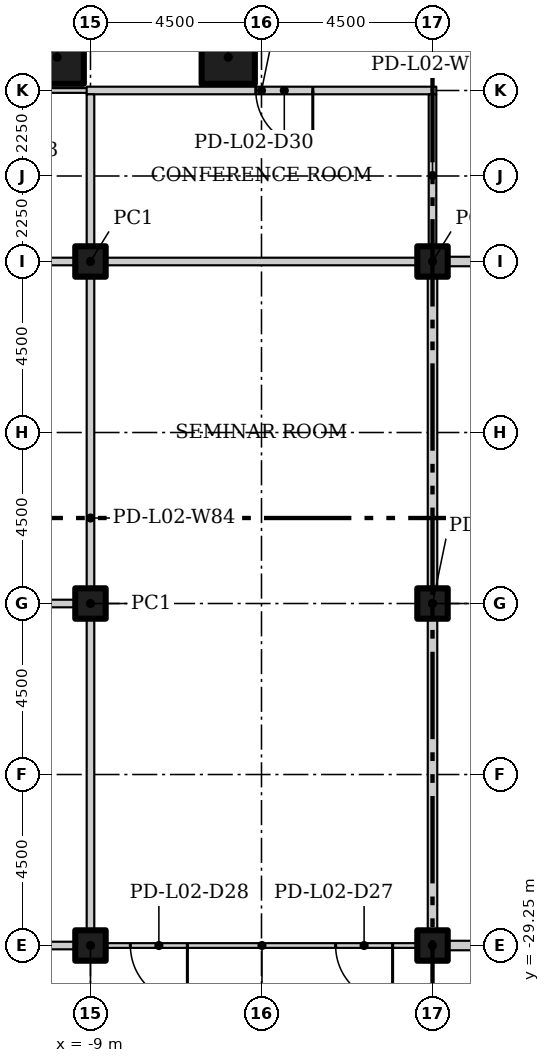
"""IFC4 building model, lengths in metres.
Left out: names, types, materials, properties, quantities, classifications, styles, units other than length and angle.
Written with IfcOpenShell. Run it as: python <this file> out.ifc"""

import sys

from ifc_helpers import new_model, si_unit, direction, frame, frame_2d, origin, origin_2d, place, context, subcontext, project, spatial, rectangle, hollow_rectangle, extrude, element, fill, save


model = new_model("IFC4")
c1 = context("Model", 3, precision=1e-05, world=origin(), true_north=direction((0.0, 1.0)))
c2 = subcontext(c1, "Body", "Model", "MODEL_VIEW")
j1 = project(units=[si_unit("LENGTHUNIT", "METRE"), si_unit("PLANEANGLEUNIT", "RADIAN")], contexts=[c1])
p1 = place(None, origin())
s1 = spatial("IfcSite", under=j1, at=p1, CompositionType="ELEMENT")
p2 = place(p1, origin())
s2 = spatial("IfcBuilding", under=s1, at=p2, CompositionType="ELEMENT")
p3 = place(p2, frame((0.0, 0.0, 12.5)))
s3 = spatial("IfcBuildingStorey", under=s2, at=p3, CompositionType="ELEMENT", Elevation=12.5)
for number, where in (
    (1, (-9.875, -5.875, 0.0)),
    (2, (-5.375, -5.875, 0.0)),
):
    element("IfcColumn", number, at=place(p3, frame(where)), inside=s3, PredefinedType="COLUMN", context=c2, shape_type="SweptSolid", body=[
        extrude(hollow_rectangle(XDim=1.4, YDim=1.4, WallThickness=0.06, at=origin_2d()), origin(), (0.0, 0.0, 1.0), 5.6),
    ])
for number, where in (
    (3, (-9.0, -29.25, 0.0)),
    (4, (-9.0, -20.25, 0.0)),
    (5, (-9.0, -11.25, 0.0)),
    (6, (0.0, -29.25, 0.0)),
    (7, (0.0, -20.25, 0.0)),
    (8, (0.0, -11.25, 0.0)),
):
    element("IfcColumn", number, at=place(p3, frame(where)), inside=s3, PredefinedType="COLUMN", context=c2, shape_type="SweptSolid", body=[
        extrude(hollow_rectangle(XDim=0.8, YDim=0.8, WallThickness=0.03, at=origin_2d()), origin(), (0.0, 0.0, 1.0), 5.6),
    ])
p4 = place(p3, frame((-13.5, -6.75, 0.0)))
e9 = element("IfcWall", 9, at=p4, inside=s3, PredefinedType="PARTITIONING", context=c2, shape_type="SweptSolid", body=[
    extrude(rectangle(XDim=4.6, YDim=0.125, at=frame_2d((2.3, 0.0))), origin(), (0.0, 0.0, 1.0), 5.6),
])
p5 = place(p4, frame((1.35, 0.0, 0.0)))
e10 = element("IfcOpeningElement", 10, at=p5, cuts=e9, PredefinedType="OPENING", context=c2, shape_type="SweptSolid", body=[
    extrude(rectangle(XDim=1.5, YDim=2.1, at=frame_2d((0.75, 1.05))), frame((0.0, 0.073, 0.0), z_axis=(0.0, -1.0, 0.0), x_axis=(1.0, 0.0, 0.0)), (0.0, 0.0, 1.0), 0.145),
])
p6 = place(p3, frame((0.1, -6.75, 0.0), z_axis=(0.0, 0.0, 1.0), x_axis=(-1.0, 0.0, 0.0)))
e11 = element("IfcWall", 11, at=p6, inside=s3, PredefinedType="PARTITIONING", context=c2, shape_type="SweptSolid", body=[
    extrude(rectangle(XDim=9.2, YDim=0.2, at=frame_2d((4.6, 0.0))), origin(), (0.0, 0.0, 1.0), 5.6),
])
p7 = place(p6, frame((3.25, 0.0, 0.0)))
e12 = element("IfcOpeningElement", 12, at=p7, cuts=e11, PredefinedType="OPENING", context=c2, shape_type="SweptSolid", body=[
    extrude(rectangle(XDim=1.5, YDim=2.1, at=frame_2d((0.75, 1.05))), frame((0.0, 0.11, 0.0), z_axis=(0.0, -1.0, 0.0), x_axis=(1.0, 0.0, 0.0)), (0.0, 0.0, 1.0), 0.22),
])
p8 = place(p3, frame((27.125, -29.25, 0.0), z_axis=(0.0, 0.0, 1.0), x_axis=(-1.0, 0.0, 0.0)))
e13 = element("IfcWall", 13, at=p8, inside=s3, PredefinedType="PARTITIONING", context=c2, shape_type="SweptSolid", body=[
    extrude(rectangle(XDim=27.25, YDim=0.25, at=frame_2d((13.625, 0.0))), origin(), (0.0, 0.0, 1.0), 5.6),
])
p9 = place(p8, frame((12.725, 0.0, 0.0)))
e14 = element("IfcOpeningElement", 14, at=p9, cuts=e13, PredefinedType="OPENING", context=c2, shape_type="SweptSolid", body=[
    extrude(rectangle(XDim=1.8, YDim=2.4, at=frame_2d((0.9, 1.2))), frame((0.0, 0.135, 0.0), z_axis=(0.0, -1.0, 0.0), x_axis=(1.0, 0.0, 0.0)), (0.0, 0.0, 1.0), 0.27),
])
p10 = place(p3, frame((-8.9, -29.25, 0.0), z_axis=(0.0, 0.0, 1.0), x_axis=(-1.0, 0.0, 0.0)))
e15 = element("IfcWall", 15, at=p10, inside=s3, PredefinedType="PARTITIONING", context=c2, shape_type="SweptSolid", body=[
    extrude(rectangle(XDim=18.2, YDim=0.2, at=frame_2d((9.1, 0.0))), origin(), (0.0, 0.0, 1.0), 5.6),
])
p11 = place(p10, frame((3.85, 0.0, 0.0)))
e16 = element("IfcOpeningElement", 16, at=p11, cuts=e15, PredefinedType="OPENING", context=c2, shape_type="SweptSolid", body=[
    extrude(rectangle(XDim=1.5, YDim=2.1, at=frame_2d((0.75, 1.05))), frame((0.0, 0.11, 0.0), z_axis=(0.0, -1.0, 0.0), x_axis=(1.0, 0.0, 0.0)), (0.0, 0.0, 1.0), 0.22),
])
p12 = place(p3, frame((0.125, -29.25, 0.0), z_axis=(0.0, 0.0, 1.0), x_axis=(-1.0, 0.0, 0.0)))
e17 = element("IfcWall", 17, at=p12, inside=s3, PredefinedType="PARTITIONING", context=c2, shape_type="SweptSolid", body=[
    extrude(rectangle(XDim=9.225, YDim=0.125, at=frame_2d((4.613, 0.0))), origin(), (0.0, 0.0, 1.0), 5.6),
])
p13 = place(p12, frame((1.175, 0.0, 0.0)))
e18 = element("IfcOpeningElement", 18, at=p13, cuts=e17, PredefinedType="OPENING", context=c2, shape_type="SweptSolid", body=[
    extrude(rectangle(XDim=1.5, YDim=2.1, at=frame_2d((0.75, 1.05))), frame((0.0, 0.073, 0.0), z_axis=(0.0, -1.0, 0.0), x_axis=(1.0, 0.0, 0.0)), (0.0, 0.0, 1.0), 0.145),
])
p14 = place(p12, frame((6.575, 0.0, 0.0)))
e19 = element("IfcOpeningElement", 19, at=p14, cuts=e17, PredefinedType="OPENING", context=c2, shape_type="SweptSolid", body=[
    extrude(rectangle(XDim=1.5, YDim=2.1, at=frame_2d((0.75, 1.05))), frame((0.0, 0.073, 0.0), z_axis=(0.0, -1.0, 0.0), x_axis=(1.0, 0.0, 0.0)), (0.0, 0.0, 1.0), 0.145),
])
p15 = place(p3, frame((0.0, -11.375, 0.0), z_axis=(0.0, 0.0, 1.0), x_axis=(0.0, -1.0, 0.0)))
e20 = element("IfcWall", 20, at=p15, inside=s3, PredefinedType="PARTITIONING", context=c2, shape_type="SweptSolid", body=[
    extrude(rectangle(XDim=17.75, YDim=0.25, at=frame_2d((8.875, 0.0))), origin(), (0.0, 0.0, 1.0), 5.6),
])
p16 = place(p3, frame((-0.125, -11.25, 0.0)))
e21 = element("IfcWall", 21, at=p16, inside=s3, PredefinedType="PARTITIONING", context=c2, shape_type="SweptSolid", body=[
    extrude(rectangle(XDim=18.25, YDim=0.25, at=frame_2d((9.125, 0.0))), origin(), (0.0, 0.0, 1.0), 5.6),
])
p17 = place(p16, frame((3.725, 0.0, 0.0)))
e22 = element("IfcOpeningElement", 22, at=p17, cuts=e21, PredefinedType="OPENING", context=c2, shape_type="SweptSolid", body=[
    extrude(rectangle(XDim=1.8, YDim=2.4, at=frame_2d((0.9, 1.2))), frame((0.0, 0.135, 0.0), z_axis=(0.0, -1.0, 0.0), x_axis=(1.0, 0.0, 0.0)), (0.0, 0.0, 1.0), 0.27),
])
p18 = place(p3, frame((0.125, -11.25, 0.0), z_axis=(0.0, 0.0, 1.0), x_axis=(-1.0, 0.0, 0.0)))
e23 = element("IfcWall", 23, at=p18, inside=s3, PredefinedType="PARTITIONING", context=c2, shape_type="SweptSolid", body=[
    extrude(rectangle(XDim=27.225, YDim=0.2, at=frame_2d((13.613, 0.0))), origin(), (0.0, 0.0, 1.0), 5.6),
])
p19 = place(p3, frame((-9.1, -20.25, 0.0), z_axis=(0.0, 0.0, 1.0), x_axis=(-1.0, 0.0, 0.0)))
e24 = element("IfcWall", 24, at=p19, inside=s3, PredefinedType="PARTITIONING", context=c2, shape_type="SweptSolid", body=[
    extrude(rectangle(XDim=17.8, YDim=0.2, at=frame_2d((8.9, 0.0))), origin(), (0.0, 0.0, 1.0), 5.6),
])
p20 = place(p3, frame((-9.0, -29.15, 0.0), z_axis=(0.0, 0.0, 1.0), x_axis=(0.0, 1.0, 0.0)))
e25 = element("IfcWall", 25, at=p20, inside=s3, PredefinedType="PARTITIONING", context=c2, shape_type="SweptSolid", body=[
    extrude(rectangle(XDim=22.3, YDim=0.2, at=frame_2d((11.15, 0.0))), origin(), (0.0, 0.0, 1.0), 5.6),
])
p21 = place(p3, frame((0.0, -11.125, 0.0), z_axis=(0.0, 0.0, 1.0), x_axis=(0.0, 1.0, 0.0)))
e26 = element("IfcWall", 26, at=p21, inside=s3, PredefinedType="PARTITIONING", context=c2, shape_type="SweptSolid", body=[
    extrude(rectangle(XDim=4.275, YDim=0.2, at=frame_2d((2.137, 0.0))), origin(), (0.0, 0.0, 1.0), 5.6),
])
p22 = place(p13, origin())
e27 = element("IfcDoor", 27, at=p22, inside=s3, OperationType="DOUBLE_DOOR_SINGLE_SWING", PredefinedType="DOOR", context=c2, shape_type="SweptSolid", body=[
    extrude(rectangle(XDim=1.5, YDim=2.1, at=frame_2d((0.75, 1.05))), frame((0.0, 0.025, 0.0), z_axis=(0.0, -1.0, 0.0), x_axis=(1.0, 0.0, 0.0)), (0.0, 0.0, 1.0), 0.05),
])
fill(e18, e27)
p23 = place(p14, origin())
e28 = element("IfcDoor", 28, at=p23, inside=s3, OperationType="DOUBLE_DOOR_SINGLE_SWING", PredefinedType="DOOR", context=c2, shape_type="SweptSolid", body=[
    extrude(rectangle(XDim=1.5, YDim=2.1, at=frame_2d((0.75, 1.05))), frame((0.0, 0.025, 0.0), z_axis=(0.0, -1.0, 0.0), x_axis=(1.0, 0.0, 0.0)), (0.0, 0.0, 1.0), 0.05),
])
fill(e19, e28)
p24 = place(p7, origin())
e29 = element("IfcDoor", 29, at=p24, inside=s3, OperationType="DOUBLE_DOOR_SINGLE_SWING", PredefinedType="DOOR", context=c2, shape_type="SweptSolid", body=[
    extrude(rectangle(XDim=1.5, YDim=2.1, at=frame_2d((0.75, 1.05))), frame((0.0, 0.025, 0.0), z_axis=(0.0, -1.0, 0.0), x_axis=(1.0, 0.0, 0.0)), (0.0, 0.0, 1.0), 0.05),
])
fill(e12, e29)
save(model, sys.argv[1])
